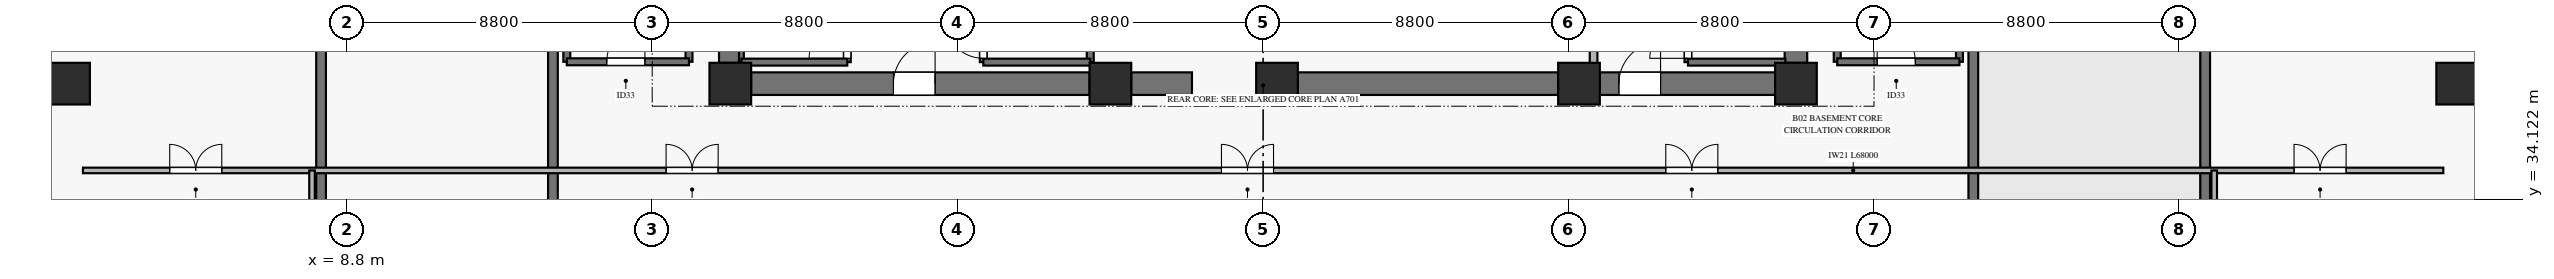
"""IFC4 building model, lengths in metres.
Left out: names, types, materials, properties, quantities, classifications, styles, units other than length and angle.
Written with IfcOpenShell. Run it as: python <this file> out.ifc"""

import sys

from ifc_helpers import new_model, si_unit, direction, frame, frame_2d, origin, origin_2d, place, context, subcontext, project, spatial, rectangle, hollow_rectangle, extrude, source, transform, mapped, element, fill, save


model = new_model("IFC4")
c1 = context("Model", 3, precision=1e-05, world=origin(), true_north=direction((0.0, 1.0)))
c2 = subcontext(c1, "Body", "Model", "MODEL_VIEW")
j1 = project(units=[si_unit("LENGTHUNIT", "METRE"), si_unit("PLANEANGLEUNIT", "RADIAN")], contexts=[c1])
p1 = place(None, origin())
s1 = spatial("IfcSite", under=j1, at=p1, CompositionType="ELEMENT")
p2 = place(p1, origin())
s2 = spatial("IfcBuilding", under=s1, at=p2, CompositionType="ELEMENT")
p3 = place(p2, frame((0.0, 0.0, -10.4)))
s3 = spatial("IfcBuildingStorey", under=s2, at=p3, CompositionType="ELEMENT", Elevation=-10.4)
m1 = source(origin(), c2, "Body", "SweptSolid", [
    extrude(rectangle(XDim=1.2, YDim=1.2, at=origin_2d()), origin(), (0.0, 0.0, 1.0), 4.9),
])
for number, where, z_axis, x_axis in (
    (1, (19.85, 37.45, 0.0), (0.0, 0.0, 1.0), (1.0, 0.0, 0.0)),
    (2, (30.8, 37.45, 0.0), (0.0, 0.0, 1.0), (1.0, 0.0, 0.0)),
    (3, (35.6, 37.45, 0.0), (0.0, 0.0, 1.0), (1.0, 0.0, 0.0)),
    (4, (44.3, 37.45, 0.0), (0.0, 0.0, 1.0), (1.0, 0.0, 0.0)),
    (5, (50.55, 37.45, 0.0), (0.0, 0.0, 1.0), (1.0, 0.0, 0.0)),
):
    element("IfcColumn", number, at=place(p3, frame(where, z_axis=z_axis, x_axis=x_axis)), inside=s3, PredefinedType="PILASTER", context=c2, shape_type="MappedRepresentation", body=[
        mapped(m1, transform((0.0, 0.0, 0.0), x_axis=(1.0, 0.0, 0.0), y_axis=(0.0, 1.0, 0.0), z_axis=(0.0, 0.0, 1.0), scale=1.0)),
    ])
p4 = place(p3, frame((20.45, 37.45, 0.0), z_axis=(0.0, 0.0, 1.0), x_axis=(1.0, 0.0, 0.0)))
e6 = element("IfcWall", 6, at=p4, inside=s3, PredefinedType="SHEAR", context=c2, shape_type="SweptSolid", body=[
    extrude(rectangle(XDim=9.75, YDim=0.65, at=frame_2d((4.875, 0.0))), origin(), (0.0, 0.0, 1.0), 4.9),
])
p5 = place(p4, frame((4.1, 0.0, 0.0)))
e7 = element("IfcOpeningElement", 7, at=p5, cuts=e6, PredefinedType="OPENING", context=c2, shape_type="SweptSolid", body=[
    extrude(rectangle(XDim=1.2, YDim=2.15, at=frame_2d((0.6, 1.075))), frame((0.0, 0.335, 0.0), z_axis=(0.0, -1.0, 0.0), x_axis=(1.0, 0.0, 0.0)), (0.0, 0.0, 1.0), 0.67),
])
p6 = place(p3, frame((31.4, 37.45, 0.0), z_axis=(0.0, 0.0, 1.0), x_axis=(1.0, 0.0, 0.0)))
e8 = element("IfcWall", 8, at=p6, inside=s3, PredefinedType="SHEAR", context=c2, shape_type="SweptSolid", body=[
    extrude(rectangle(XDim=1.75, YDim=0.65, at=frame_2d((0.875, 0.0))), origin(), (0.0, 0.0, 1.0), 4.9),
])
p7 = place(p3, frame((36.2, 37.45, 0.0), z_axis=(0.0, 0.0, 1.0), x_axis=(1.0, 0.0, 0.0)))
e9 = element("IfcWall", 9, at=p7, inside=s3, PredefinedType="SHEAR", context=c2, shape_type="SweptSolid", body=[
    extrude(rectangle(XDim=7.5, YDim=0.65, at=frame_2d((3.75, 0.0))), origin(), (0.0, 0.0, 1.0), 4.9),
])
p8 = place(p3, frame((44.9, 37.45, 0.0), z_axis=(0.0, 0.0, 1.0), x_axis=(1.0, 0.0, 0.0)))
e10 = element("IfcWall", 10, at=p8, inside=s3, PredefinedType="SHEAR", context=c2, shape_type="SweptSolid", body=[
    extrude(rectangle(XDim=5.05, YDim=0.65, at=frame_2d((2.525, 0.0))), origin(), (0.0, 0.0, 1.0), 4.9),
])
p9 = place(p8, frame((0.55, 0.0, 0.0)))
e11 = element("IfcOpeningElement", 11, at=p9, cuts=e10, PredefinedType="OPENING", context=c2, shape_type="SweptSolid", body=[
    extrude(rectangle(XDim=1.2, YDim=2.15, at=frame_2d((0.6, 1.075))), frame((0.0, 0.335, 0.0), z_axis=(0.0, -1.0, 0.0), x_axis=(1.0, 0.0, 0.0)), (0.0, 0.0, 1.0), 0.67),
])
for number, where, z_axis, x_axis in (
    (12, (19.85, 38.05, 0.0), (0.0, 0.0, 1.0), (0.0, 1.0, 0.0)),
    (13, (50.55, 38.05, 0.0), (0.0, 0.0, 1.0), (0.0, 1.0, 0.0)),
):
    element("IfcWall", number, at=place(p3, frame(where, z_axis=z_axis, x_axis=x_axis)), inside=s3, PredefinedType="SHEAR", context=c2, shape_type="SweptSolid", body=[
        extrude(rectangle(XDim=7.9, YDim=0.65, at=frame_2d((3.95, 0.0))), origin(), (0.0, 0.0, 1.0), 4.9),
    ])
m2 = source(origin(), c2, "Body", "SweptSolid", [
    extrude(hollow_rectangle(XDim=1.2, YDim=1.2, WallThickness=0.055, at=origin_2d()), origin(), (0.0, 0.0, 1.0), 4.9),
])
for number, where, z_axis, x_axis in (
    (14, (0.8, 37.45, 0.0), (0.0, 0.0, 1.0), (1.0, 0.0, 0.0)),
    (15, (69.6, 37.45, 0.0), (0.0, 0.0, 1.0), (1.0, 0.0, 0.0)),
):
    element("IfcColumn", number, at=place(p3, frame(where, z_axis=z_axis, x_axis=x_axis)), inside=s3, PredefinedType="COLUMN", context=c2, shape_type="MappedRepresentation", body=[
        mapped(m2, transform((0.0, 0.0, 0.0), x_axis=(1.0, 0.0, 0.0), y_axis=(0.0, 1.0, 0.0), z_axis=(0.0, 0.0, 1.0), scale=1.0)),
    ])
for number, where, z_axis, x_axis in (
    (16, (55.66, 3.46, 0.0), (0.0, 0.0, 1.0), (0.0, 1.0, 0.0)),
    (17, (62.34, 3.46, 0.0), (0.0, 0.0, 1.0), (0.0, 1.0, 0.0)),
):
    element("IfcWall", number, at=place(p3, frame(where, z_axis=z_axis, x_axis=x_axis)), inside=s3, PredefinedType="SOLIDWALL", context=c2, shape_type="SweptSolid", body=[
        extrude(rectangle(XDim=41.74, YDim=0.28, at=frame_2d((20.87, 0.0))), origin(), (0.0, 0.0, 1.0), 5.2),
    ])
for number, where, z_axis, x_axis in (
    (18, (8.06, 6.76, 0.0), (0.0, 0.0, 1.0), (0.0, 1.0, 0.0)),
    (19, (14.74, 6.76, 0.0), (0.0, 0.0, 1.0), (0.0, 1.0, 0.0)),
):
    element("IfcWall", number, at=place(p3, frame(where, z_axis=z_axis, x_axis=x_axis)), inside=s3, PredefinedType="SOLIDWALL", context=c2, shape_type="SweptSolid", body=[
        extrude(rectangle(XDim=42.0, YDim=0.28, at=frame_2d((21.0, 0.0))), origin(), (0.0, 0.0, 1.0), 5.2),
    ])
p10 = place(p3, frame((20.17, 38.07, 0.0), z_axis=(0.0, 0.0, 1.0), x_axis=(0.0, 1.0, 0.0)))
e20 = element("IfcWall", 20, at=p10, inside=s3, PredefinedType="SOLIDWALL", context=c2, shape_type="SweptSolid", body=[
    extrude(rectangle(XDim=7.25, YDim=0.14, at=frame_2d((3.625, 0.0))), origin(), (0.0, 0.0, 1.0), 5.2),
])
p11 = place(p3, frame((23.22, 38.07, 0.0), z_axis=(0.0, 0.0, 1.0), x_axis=(0.0, 1.0, 0.0)))
e21 = element("IfcWall", 21, at=p11, inside=s3, PredefinedType="SOLIDWALL", context=c2, shape_type="SweptSolid", body=[
    extrude(rectangle(XDim=7.25, YDim=0.2, at=frame_2d((3.625, 0.0))), origin(), (0.0, 0.0, 1.0), 5.2),
])
p12 = place(p11, frame((0.11, 0.0, 0.0)))
e22 = element("IfcOpeningElement", 22, at=p12, cuts=e21, PredefinedType="OPENING", context=c2, shape_type="SweptSolid", body=[
    extrude(rectangle(XDim=1.1, YDim=2.15, at=frame_2d((0.55, 1.075))), frame((0.0, 0.11, 0.0), z_axis=(0.0, -1.0, 0.0), x_axis=(1.0, 0.0, 0.0)), (0.0, 0.0, 1.0), 0.22),
])
p13 = place(p3, frame((20.17, 38.07, 0.0), z_axis=(0.0, 0.0, 1.0), x_axis=(1.0, 0.0, 0.0)))
e23 = element("IfcWall", 23, at=p13, inside=s3, PredefinedType="SOLIDWALL", context=c2, shape_type="SweptSolid", body=[
    extrude(rectangle(XDim=3.05, YDim=0.2, at=frame_2d((1.525, 0.0))), origin(), (0.0, 0.0, 1.0), 5.2),
])
p14 = place(p3, frame((27.14, 38.07, 0.0), z_axis=(0.0, 0.0, 1.0), x_axis=(0.0, 1.0, 0.0)))
e24 = element("IfcWall", 24, at=p14, inside=s3, PredefinedType="SOLIDWALL", context=c2, shape_type="SweptSolid", body=[
    extrude(rectangle(XDim=7.25, YDim=0.2, at=frame_2d((3.625, 0.0))), origin(), (0.0, 0.0, 1.0), 5.2),
])
p15 = place(p14, frame((0.11, 0.0, 0.0)))
e25 = element("IfcOpeningElement", 25, at=p15, cuts=e24, PredefinedType="OPENING", context=c2, shape_type="SweptSolid", body=[
    extrude(rectangle(XDim=1.1, YDim=2.15, at=frame_2d((0.55, 1.075))), frame((0.0, 0.11, 0.0), z_axis=(0.0, -1.0, 0.0), x_axis=(1.0, 0.0, 0.0)), (0.0, 0.0, 1.0), 0.22),
])
p16 = place(p3, frame((30.22, 38.07, 0.0), z_axis=(0.0, 0.0, 1.0), x_axis=(0.0, 1.0, 0.0)))
e26 = element("IfcWall", 26, at=p16, inside=s3, PredefinedType="SOLIDWALL", context=c2, shape_type="SweptSolid", body=[
    extrude(rectangle(XDim=7.25, YDim=0.2, at=frame_2d((3.625, 0.0))), origin(), (0.0, 0.0, 1.0), 5.2),
])
p17 = place(p3, frame((27.14, 38.07, 0.0), z_axis=(0.0, 0.0, 1.0), x_axis=(1.0, 0.0, 0.0)))
e27 = element("IfcWall", 27, at=p17, inside=s3, PredefinedType="SOLIDWALL", context=c2, shape_type="SweptSolid", body=[
    extrude(rectangle(XDim=3.08, YDim=0.2, at=frame_2d((1.54, 0.0))), origin(), (0.0, 0.0, 1.0), 5.2),
])
p18 = place(p3, frame((47.44, 38.07, 0.0), z_axis=(0.0, 0.0, 1.0), x_axis=(0.0, 1.0, 0.0)))
e28 = element("IfcWall", 28, at=p18, inside=s3, PredefinedType="SOLIDWALL", context=c2, shape_type="SweptSolid", body=[
    extrude(rectangle(XDim=7.25, YDim=0.2, at=frame_2d((3.625, 0.0))), origin(), (0.0, 0.0, 1.0), 5.2),
])
p19 = place(p18, frame((0.11, 0.0, 0.0)))
e29 = element("IfcOpeningElement", 29, at=p19, cuts=e28, PredefinedType="OPENING", context=c2, shape_type="SweptSolid", body=[
    extrude(rectangle(XDim=1.1, YDim=2.15, at=frame_2d((0.55, 1.075))), frame((0.0, 0.11, 0.0), z_axis=(0.0, -1.0, 0.0), x_axis=(1.0, 0.0, 0.0)), (0.0, 0.0, 1.0), 0.22),
])
p20 = place(p3, frame((47.44, 38.07, 0.0), z_axis=(0.0, 0.0, 1.0), x_axis=(1.0, 0.0, 0.0)))
e30 = element("IfcWall", 30, at=p20, inside=s3, PredefinedType="SOLIDWALL", context=c2, shape_type="SweptSolid", body=[
    extrude(rectangle(XDim=2.805, YDim=0.2, at=frame_2d((1.403, 0.0))), origin(), (0.0, 0.0, 1.0), 5.2),
])
p21 = place(p3, frame((44.72, 37.755, 0.0), z_axis=(0.0, 0.0, 1.0), x_axis=(0.0, 1.0, 0.0)))
e31 = element("IfcWall", 31, at=p21, inside=s3, PredefinedType="SOLIDWALL", context=c2, shape_type="SweptSolid", body=[
    extrude(rectangle(XDim=7.465, YDim=0.22, at=frame_2d((3.732, 0.0))), origin(), (0.0, 0.0, 1.0), 4.9),
])
for number, where, z_axis, x_axis in (
    (32, (15.14, 38.08, 0.0), (0.0, 0.0, 1.0), (0.0, 1.0, 0.0)),
    (33, (18.66, 38.08, 0.0), (0.0, 0.0, 1.0), (0.0, 1.0, 0.0)),
):
    element("IfcWall", number, at=place(p3, frame(where, z_axis=z_axis, x_axis=x_axis)), inside=s3, PredefinedType="SOLIDWALL", context=c2, shape_type="SweptSolid", body=[
        extrude(rectangle(XDim=7.9, YDim=0.2, at=frame_2d((3.95, 0.0))), origin(), (0.0, 0.0, 1.0), 5.2),
    ])
p22 = place(p3, frame((15.14, 38.08, 0.0), z_axis=(0.0, 0.0, 1.0), x_axis=(1.0, 0.0, 0.0)))
e34 = element("IfcWall", 34, at=p22, inside=s3, PredefinedType="SOLIDWALL", context=c2, shape_type="SweptSolid", body=[
    extrude(rectangle(XDim=3.52, YDim=0.2, at=frame_2d((1.76, 0.0))), origin(), (0.0, 0.0, 1.0), 5.2),
])
p23 = place(p22, frame((1.15, 0.0, 0.0)))
e35 = element("IfcOpeningElement", 35, at=p23, cuts=e34, PredefinedType="OPENING", context=c2, shape_type="SweptSolid", body=[
    extrude(rectangle(XDim=1.1, YDim=2.15, at=frame_2d((0.55, 1.075))), frame((0.0, 0.11, 0.0), z_axis=(0.0, -1.0, 0.0), x_axis=(1.0, 0.0, 0.0)), (0.0, 0.0, 1.0), 0.22),
])
for number, where, z_axis, x_axis in (
    (36, (51.74, 38.08, 0.0), (0.0, 0.0, 1.0), (0.0, 1.0, 0.0)),
    (37, (55.26, 38.08, 0.0), (0.0, 0.0, 1.0), (0.0, 1.0, 0.0)),
):
    element("IfcWall", number, at=place(p3, frame(where, z_axis=z_axis, x_axis=x_axis)), inside=s3, PredefinedType="SOLIDWALL", context=c2, shape_type="SweptSolid", body=[
        extrude(rectangle(XDim=7.9, YDim=0.2, at=frame_2d((3.95, 0.0))), origin(), (0.0, 0.0, 1.0), 5.2),
    ])
p24 = place(p3, frame((51.74, 38.08, 0.0), z_axis=(0.0, 0.0, 1.0), x_axis=(1.0, 0.0, 0.0)))
e38 = element("IfcWall", 38, at=p24, inside=s3, PredefinedType="SOLIDWALL", context=c2, shape_type="SweptSolid", body=[
    extrude(rectangle(XDim=3.52, YDim=0.2, at=frame_2d((1.76, 0.0))), origin(), (0.0, 0.0, 1.0), 5.2),
])
p25 = place(p24, frame((1.15, 0.0, 0.0)))
e39 = element("IfcOpeningElement", 39, at=p25, cuts=e38, PredefinedType="OPENING", context=c2, shape_type="SweptSolid", body=[
    extrude(rectangle(XDim=1.1, YDim=2.15, at=frame_2d((0.55, 1.075))), frame((0.0, 0.11, 0.0), z_axis=(0.0, -1.0, 0.0), x_axis=(1.0, 0.0, 0.0)), (0.0, 0.0, 1.0), 0.22),
])
p26 = place(p3, frame((1.2, 34.95, 0.0), z_axis=(0.0, 0.0, 1.0), x_axis=(1.0, 0.0, 0.0)))
e40 = element("IfcWall", 40, at=p26, inside=s3, PredefinedType="PARTITIONING", context=c2, shape_type="SweptSolid", body=[
    extrude(rectangle(XDim=68.0, YDim=0.16, at=frame_2d((34.0, 0.0))), origin(), (0.0, 0.0, 1.0), 3.785),
])
p27 = place(p26, frame((16.8, 0.0, 0.0)))
e41 = element("IfcOpeningElement", 41, at=p27, cuts=e40, PredefinedType="OPENING", context=c2, shape_type="SweptSolid", body=[
    extrude(rectangle(XDim=1.5, YDim=2.2, at=frame_2d((0.75, 1.1))), frame((0.0, 0.09, 0.0), z_axis=(0.0, -1.0, 0.0), x_axis=(1.0, 0.0, 0.0)), (0.0, 0.0, 1.0), 0.18),
])
p28 = place(p26, frame((32.8, 0.0, 0.0)))
e42 = element("IfcOpeningElement", 42, at=p28, cuts=e40, PredefinedType="OPENING", context=c2, shape_type="SweptSolid", body=[
    extrude(rectangle(XDim=1.5, YDim=2.2, at=frame_2d((0.75, 1.1))), frame((0.0, 0.09, 0.0), z_axis=(0.0, -1.0, 0.0), x_axis=(1.0, 0.0, 0.0)), (0.0, 0.0, 1.0), 0.18),
])
p29 = place(p26, frame((45.6, 0.0, 0.0)))
e43 = element("IfcOpeningElement", 43, at=p29, cuts=e40, PredefinedType="OPENING", context=c2, shape_type="SweptSolid", body=[
    extrude(rectangle(XDim=1.5, YDim=2.2, at=frame_2d((0.75, 1.1))), frame((0.0, 0.09, 0.0), z_axis=(0.0, -1.0, 0.0), x_axis=(1.0, 0.0, 0.0)), (0.0, 0.0, 1.0), 0.18),
])
p30 = place(p26, frame((2.5, 0.0, 0.0)))
e44 = element("IfcOpeningElement", 44, at=p30, cuts=e40, PredefinedType="OPENING", context=c2, shape_type="SweptSolid", body=[
    extrude(rectangle(XDim=1.5, YDim=2.2, at=frame_2d((0.75, 1.1))), frame((0.0, 0.09, 0.0), z_axis=(0.0, -1.0, 0.0), x_axis=(1.0, 0.0, 0.0)), (0.0, 0.0, 1.0), 0.18),
])
p31 = place(p26, frame((63.7, 0.0, 0.0)))
e45 = element("IfcOpeningElement", 45, at=p31, cuts=e40, PredefinedType="OPENING", context=c2, shape_type="SweptSolid", body=[
    extrude(rectangle(XDim=1.5, YDim=2.2, at=frame_2d((0.75, 1.1))), frame((0.0, 0.09, 0.0), z_axis=(0.0, -1.0, 0.0), x_axis=(1.0, 0.0, 0.0)), (0.0, 0.0, 1.0), 0.18),
])
for number, where, z_axis, x_axis in (
    (46, (7.8, 1.0, 0.0), (0.0, 0.0, 1.0), (0.0, 1.0, 0.0)),
    (47, (62.6, 1.0, 0.0), (0.0, 0.0, 1.0), (0.0, 1.0, 0.0)),
):
    element("IfcWall", number, at=place(p3, frame(where, z_axis=z_axis, x_axis=x_axis)), inside=s3, PredefinedType="PARTITIONING", context=c2, shape_type="SweptSolid", body=[
        extrude(rectangle(XDim=33.95, YDim=0.16, at=frame_2d((16.975, 0.0))), origin(), (0.0, 0.0, 1.0), 3.785),
    ])
m3 = source(origin(), c2, "Body", "SweptSolid", [
    extrude(rectangle(XDim=1.1, YDim=2.15, at=frame_2d((0.55, 1.075))), frame((0.0, 0.025, 0.0), z_axis=(0.0, -1.0, 0.0), x_axis=(1.0, 0.0, 0.0)), (0.0, 0.0, 1.0), 0.05),
])
p32 = place(p12, origin())
e48 = element("IfcDoor", 48, at=p32, inside=s3, OperationType="SINGLE_SWING_LEFT", PredefinedType="DOOR", context=c2, shape_type="MappedRepresentation", body=[
    mapped(m3, transform((0.0, 0.0, 0.0), x_axis=(1.0, 0.0, 0.0), y_axis=(0.0, 1.0, 0.0), z_axis=(0.0, 0.0, 1.0), scale=1.0)),
])
fill(e22, e48)
p33 = place(p15, origin())
e49 = element("IfcDoor", 49, at=p33, inside=s3, OperationType="SINGLE_SWING_RIGHT", PredefinedType="DOOR", context=c2, shape_type="MappedRepresentation", body=[
    mapped(m3, transform((0.0, 0.0, 0.0), x_axis=(1.0, 0.0, 0.0), y_axis=(0.0, 1.0, 0.0), z_axis=(0.0, 0.0, 1.0), scale=1.0)),
])
fill(e25, e49)
p34 = place(p19, origin())
e50 = element("IfcDoor", 50, at=p34, inside=s3, OperationType="SINGLE_SWING_LEFT", PredefinedType="DOOR", context=c2, shape_type="MappedRepresentation", body=[
    mapped(m3, transform((0.0, 0.0, 0.0), x_axis=(1.0, 0.0, 0.0), y_axis=(0.0, 1.0, 0.0), z_axis=(0.0, 0.0, 1.0), scale=1.0)),
])
fill(e29, e50)
m4 = source(origin(), c2, "Body", "SweptSolid", [
    extrude(rectangle(XDim=1.2, YDim=2.15, at=frame_2d((0.6, 1.075))), frame((0.0, 0.025, 0.0), z_axis=(0.0, -1.0, 0.0), x_axis=(1.0, 0.0, 0.0)), (0.0, 0.0, 1.0), 0.05),
])
p35 = place(p5, origin())
e51 = element("IfcDoor", 51, at=p35, inside=s3, OperationType="SINGLE_SWING_RIGHT", PredefinedType="DOOR", context=c2, shape_type="MappedRepresentation", body=[
    mapped(m4, transform((0.0, 0.0, 0.0), x_axis=(1.0, 0.0, 0.0), y_axis=(0.0, 1.0, 0.0), z_axis=(0.0, 0.0, 1.0), scale=1.0)),
])
fill(e7, e51)
p36 = place(p9, origin())
e52 = element("IfcDoor", 52, at=p36, inside=s3, OperationType="SINGLE_SWING_RIGHT", PredefinedType="DOOR", context=c2, shape_type="MappedRepresentation", body=[
    mapped(m4, transform((0.0, 0.0, 0.0), x_axis=(1.0, 0.0, 0.0), y_axis=(0.0, 1.0, 0.0), z_axis=(0.0, 0.0, 1.0), scale=1.0)),
])
fill(e11, e52)
p37 = place(p23, origin())
e53 = element("IfcDoor", 53, at=p37, inside=s3, OperationType="SINGLE_SWING_RIGHT", PredefinedType="DOOR", context=c2, shape_type="MappedRepresentation", body=[
    mapped(m3, transform((0.0, 0.0, 0.0), x_axis=(1.0, 0.0, 0.0), y_axis=(0.0, 1.0, 0.0), z_axis=(0.0, 0.0, 1.0), scale=1.0)),
])
fill(e35, e53)
p38 = place(p25, origin())
e54 = element("IfcDoor", 54, at=p38, inside=s3, OperationType="SINGLE_SWING_LEFT", PredefinedType="DOOR", context=c2, shape_type="MappedRepresentation", body=[
    mapped(m3, transform((0.0, 0.0, 0.0), x_axis=(1.0, 0.0, 0.0), y_axis=(0.0, 1.0, 0.0), z_axis=(0.0, 0.0, 1.0), scale=1.0)),
])
fill(e39, e54)
m5 = source(origin(), c2, "Body", "SweptSolid", [
    extrude(rectangle(XDim=1.5, YDim=2.2, at=frame_2d((0.75, 1.1))), frame((0.0, 0.025, 0.0), z_axis=(0.0, -1.0, 0.0), x_axis=(1.0, 0.0, 0.0)), (0.0, 0.0, 1.0), 0.05),
])
p39 = place(p27, origin())
e55 = element("IfcDoor", 55, at=p39, inside=s3, OperationType="DOUBLE_SWING_LEFT", PredefinedType="DOOR", context=c2, shape_type="MappedRepresentation", body=[
    mapped(m5, transform((0.0, 0.0, 0.0), x_axis=(1.0, 0.0, 0.0), y_axis=(0.0, 1.0, 0.0), z_axis=(0.0, 0.0, 1.0), scale=1.0)),
])
fill(e41, e55)
p40 = place(p28, origin())
e56 = element("IfcDoor", 56, at=p40, inside=s3, OperationType="DOUBLE_SWING_LEFT", PredefinedType="DOOR", context=c2, shape_type="MappedRepresentation", body=[
    mapped(m5, transform((0.0, 0.0, 0.0), x_axis=(1.0, 0.0, 0.0), y_axis=(0.0, 1.0, 0.0), z_axis=(0.0, 0.0, 1.0), scale=1.0)),
])
fill(e42, e56)
p41 = place(p29, origin())
e57 = element("IfcDoor", 57, at=p41, inside=s3, OperationType="DOUBLE_SWING_LEFT", PredefinedType="DOOR", context=c2, shape_type="MappedRepresentation", body=[
    mapped(m5, transform((0.0, 0.0, 0.0), x_axis=(1.0, 0.0, 0.0), y_axis=(0.0, 1.0, 0.0), z_axis=(0.0, 0.0, 1.0), scale=1.0)),
])
fill(e43, e57)
p42 = place(p30, origin())
e58 = element("IfcDoor", 58, at=p42, inside=s3, OperationType="DOUBLE_SWING_LEFT", PredefinedType="DOOR", context=c2, shape_type="MappedRepresentation", body=[
    mapped(m5, transform((0.0, 0.0, 0.0), x_axis=(1.0, 0.0, 0.0), y_axis=(0.0, 1.0, 0.0), z_axis=(0.0, 0.0, 1.0), scale=1.0)),
])
fill(e44, e58)
p43 = place(p31, origin())
e59 = element("IfcDoor", 59, at=p43, inside=s3, OperationType="DOUBLE_SWING_LEFT", PredefinedType="DOOR", context=c2, shape_type="MappedRepresentation", body=[
    mapped(m5, transform((0.0, 0.0, 0.0), x_axis=(1.0, 0.0, 0.0), y_axis=(0.0, 1.0, 0.0), z_axis=(0.0, 0.0, 1.0), scale=1.0)),
])
fill(e45, e59)
save(model, sys.argv[1])
